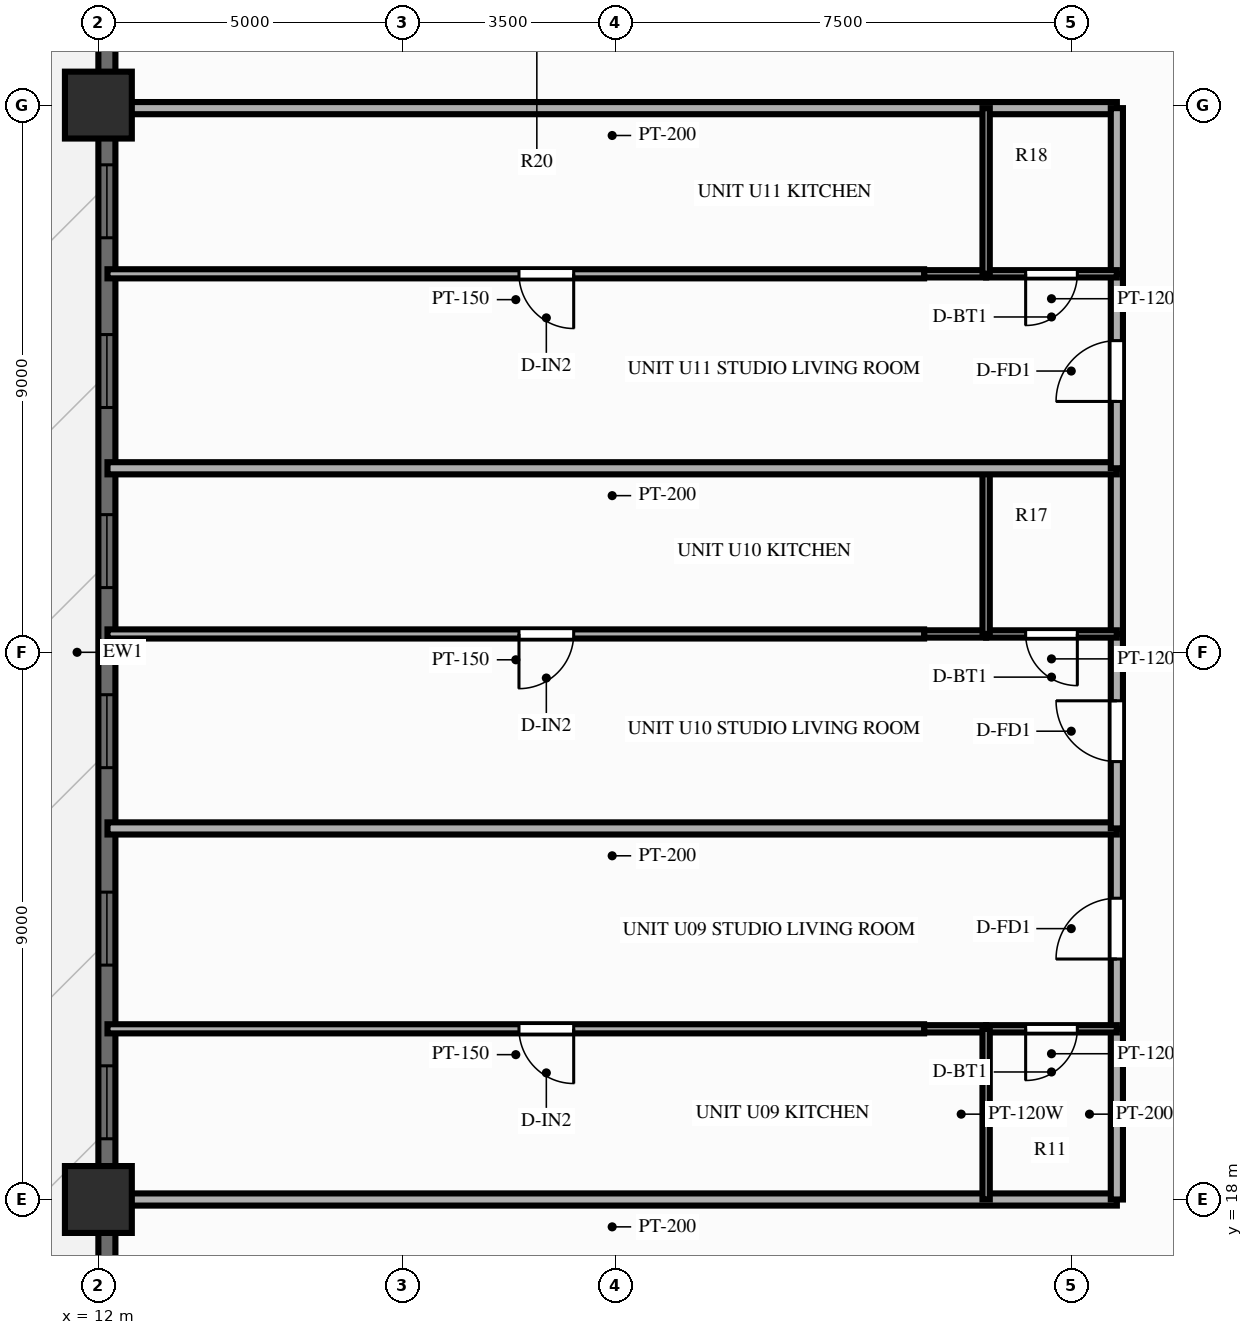
"""IFC4 building model, lengths in metres.
Left out: names, types, materials, properties, quantities, classifications, styles, units other than length and angle.
Written with IfcOpenShell. Run it as: python <this file> out.ifc"""

import sys

from ifc_helpers import new_model, si_unit, direction, frame, frame_2d, origin, origin_2d, place, context, subcontext, project, spatial, rectangle, extrude, source, transform, mapped, element, fill, save


model = new_model("IFC4")
c1 = context("Model", 3, precision=1e-05, world=origin(), true_north=direction((0.0, 1.0)))
c2 = subcontext(c1, "Body", "Model", "MODEL_VIEW")
j1 = project(units=[si_unit("LENGTHUNIT", "METRE"), si_unit("PLANEANGLEUNIT", "RADIAN")], contexts=[c1])
p1 = place(None, origin())
s1 = spatial("IfcSite", under=j1, at=p1, CompositionType="ELEMENT")
p2 = place(p1, origin())
s2 = spatial("IfcBuilding", under=s1, at=p2, CompositionType="ELEMENT")
p3 = place(p2, frame((0.0, 0.0, 34.4)))
s3 = spatial("IfcBuildingStorey", under=s2, at=p3, CompositionType="ELEMENT", Elevation=34.4)
m1 = source(origin(), c2, "Body", "SweptSolid", [
    extrude(rectangle(XDim=1.1, YDim=1.1, at=origin_2d()), origin(), (0.0, 0.0, 1.0), 3.0),
])
for number, where, z_axis, x_axis in (
    (1, (12.0, 36.0, 0.0), (0.0, 0.0, 1.0), (1.0, 0.0, 0.0)),
    (2, (12.0, 18.0, 0.0), (0.0, 0.0, 1.0), (1.0, 0.0, 0.0)),
):
    element("IfcColumn", number, at=place(p3, frame(where, z_axis=z_axis, x_axis=x_axis)), inside=s3, PredefinedType="COLUMN", context=c2, shape_type="MappedRepresentation", body=[
        mapped(m1, transform((0.0, 0.0, 0.0), scale=1.0)),
    ])
p4 = place(p3, frame((12.14, 6.5, 0.0), z_axis=(0.0, 0.0, 1.0), x_axis=(0.0, 1.0, 0.0)))
e3 = element("IfcWall", 3, at=p4, inside=s3, PredefinedType="SOLIDWALL", context=c2, shape_type="SweptSolid", body=[
    extrude(rectangle(XDim=41.0, YDim=0.28, at=frame_2d((20.5, 0.0))), origin(), (0.0, 0.0, 1.0), 2.28),
])
p5 = place(p4, frame((5.15, 0.0, 0.25)))
e4 = element("IfcOpeningElement", 4, at=p5, cuts=e3, PredefinedType="OPENING", context=c2, shape_type="SweptSolid", body=[
    extrude(rectangle(XDim=1.2, YDim=1.5, at=frame_2d((0.6, 0.75))), frame((0.0, 0.152, 0.0), z_axis=(0.0, -1.0, 0.0), x_axis=(1.0, 0.0, 0.0)), (0.0, 0.0, 1.0), 0.304),
])
p6 = place(p4, frame((12.499, 0.0, 0.25)))
e5 = element("IfcOpeningElement", 5, at=p6, cuts=e3, PredefinedType="OPENING", context=c2, shape_type="SweptSolid", body=[
    extrude(rectangle(XDim=1.2, YDim=1.5, at=frame_2d((0.6, 0.75))), frame((0.0, 0.152, 0.0), z_axis=(0.0, -1.0, 0.0), x_axis=(1.0, 0.0, 0.0)), (0.0, 0.0, 1.0), 0.304),
])
p7 = place(p4, frame((15.355, 0.0, 0.25)))
e6 = element("IfcOpeningElement", 6, at=p7, cuts=e3, PredefinedType="OPENING", context=c2, shape_type="SweptSolid", body=[
    extrude(rectangle(XDim=1.2, YDim=1.5, at=frame_2d((0.6, 0.75))), frame((0.0, 0.152, 0.0), z_axis=(0.0, -1.0, 0.0), x_axis=(1.0, 0.0, 0.0)), (0.0, 0.0, 1.0), 0.304),
])
p8 = place(p4, frame((18.602, 0.0, 0.25)))
e7 = element("IfcOpeningElement", 7, at=p8, cuts=e3, PredefinedType="OPENING", context=c2, shape_type="SweptSolid", body=[
    extrude(rectangle(XDim=1.2, YDim=1.5, at=frame_2d((0.6, 0.75))), frame((0.0, 0.152, 0.0), z_axis=(0.0, -1.0, 0.0), x_axis=(1.0, 0.0, 0.0)), (0.0, 0.0, 1.0), 0.304),
])
p9 = place(p4, frame((21.564, 0.0, 0.25)))
e8 = element("IfcOpeningElement", 8, at=p9, cuts=e3, PredefinedType="OPENING", context=c2, shape_type="SweptSolid", body=[
    extrude(rectangle(XDim=1.2, YDim=1.5, at=frame_2d((0.6, 0.75))), frame((0.0, 0.152, 0.0), z_axis=(0.0, -1.0, 0.0), x_axis=(1.0, 0.0, 0.0)), (0.0, 0.0, 1.0), 0.304),
])
p10 = place(p4, frame((24.526, 0.0, 0.25)))
e9 = element("IfcOpeningElement", 9, at=p10, cuts=e3, PredefinedType="OPENING", context=c2, shape_type="SweptSolid", body=[
    extrude(rectangle(XDim=1.2, YDim=1.5, at=frame_2d((0.6, 0.75))), frame((0.0, 0.152, 0.0), z_axis=(0.0, -1.0, 0.0), x_axis=(1.0, 0.0, 0.0)), (0.0, 0.0, 1.0), 0.304),
])
p11 = place(p4, frame((27.318, 0.0, 0.25)))
e10 = element("IfcOpeningElement", 10, at=p11, cuts=e3, PredefinedType="OPENING", context=c2, shape_type="SweptSolid", body=[
    extrude(rectangle(XDim=1.2, YDim=1.5, at=frame_2d((0.6, 0.75))), frame((0.0, 0.152, 0.0), z_axis=(0.0, -1.0, 0.0), x_axis=(1.0, 0.0, 0.0)), (0.0, 0.0, 1.0), 0.304),
])
p12 = place(p4, frame((34.45, 0.0, 0.0)))
e11 = element("IfcOpeningElement", 11, at=p12, cuts=e3, PredefinedType="OPENING", context=c2, shape_type="SweptSolid", body=[
    extrude(rectangle(XDim=1.6, YDim=2.15, at=frame_2d((0.8, 1.075))), frame((0.0, 0.152, 0.0), z_axis=(0.0, -1.0, 0.0), x_axis=(1.0, 0.0, 0.0)), (0.0, 0.0, 1.0), 0.304),
])
for number, where, z_axis, x_axis in (
    (12, (28.75, 18.0, 0.0), (0.0, 0.0, 1.0), (-1.0, 0.0, 0.0)),
    (13, (28.75, 35.95, 0.0), (0.0, 0.0, 1.0), (-1.0, 0.0, 0.0)),
):
    element("IfcWall", number, at=place(p3, frame(where, z_axis=z_axis, x_axis=x_axis)), inside=s3, PredefinedType="PARTITIONING", context=c2, shape_type="SweptSolid", body=[
        extrude(rectangle(XDim=16.6, YDim=0.2, at=frame_2d((8.3, 0.0))), origin(), (0.0, 0.0, 1.0), 2.24),
    ])
p13 = place(p3, frame((28.75, 18.0, 0.0), z_axis=(0.0, 0.0, 1.0), x_axis=(0.0, 1.0, 0.0)))
e14 = element("IfcWall", 14, at=p13, inside=s3, PredefinedType="PARTITIONING", context=c2, shape_type="SweptSolid", body=[
    extrude(rectangle(XDim=2.807, YDim=0.2, at=frame_2d((1.404, 0.0))), origin(), (0.0, 0.0, 1.0), 2.79),
])
p14 = place(p3, frame((28.75, 20.807, 0.0), z_axis=(0.0, 0.0, 1.0), x_axis=(0.0, 1.0, 0.0)))
e15 = element("IfcWall", 15, at=p14, inside=s3, PredefinedType="PARTITIONING", context=c2, shape_type="SweptSolid", body=[
    extrude(rectangle(XDim=3.296, YDim=0.2, at=frame_2d((1.648, 0.0))), origin(), (0.0, 0.0, 1.0), 2.79),
])
p15 = place(p14, frame((1.148, 0.0, 0.0)))
e16 = element("IfcOpeningElement", 16, at=p15, cuts=e15, PredefinedType="OPENING", context=c2, shape_type="SweptSolid", body=[
    extrude(rectangle(XDim=1.0, YDim=2.15, at=frame_2d((0.5, 1.075))), frame((0.0, 0.112, 0.0), z_axis=(0.0, -1.0, 0.0), x_axis=(1.0, 0.0, 0.0)), (0.0, 0.0, 1.0), 0.224),
])
p16 = place(p3, frame((28.75, 20.807, 0.0), z_axis=(0.0, 0.0, 1.0), x_axis=(-1.0, 0.0, 0.0)))
e17 = element("IfcWall", 17, at=p16, inside=s3, PredefinedType="PARTITIONING", context=c2, shape_type="SweptSolid", body=[
    extrude(rectangle(XDim=2.15, YDim=0.12, at=frame_2d((1.075, 0.0))), origin(), (0.0, 0.0, 1.0), 2.79),
])
p17 = place(p16, frame((0.65, 0.0, 0.0)))
e18 = element("IfcOpeningElement", 18, at=p17, cuts=e17, PredefinedType="OPENING", context=c2, shape_type="SweptSolid", body=[
    extrude(rectangle(XDim=0.85, YDim=2.05, at=frame_2d((0.425, 1.025))), frame((0.0, 0.072, 0.0), z_axis=(0.0, -1.0, 0.0), x_axis=(1.0, 0.0, 0.0)), (0.0, 0.0, 1.0), 0.144),
])
p18 = place(p3, frame((26.6, 20.807, 0.0), z_axis=(0.0, 0.0, 1.0), x_axis=(-1.0, 0.0, 0.0)))
e19 = element("IfcWall", 19, at=p18, inside=s3, PredefinedType="PARTITIONING", context=c2, shape_type="SweptSolid", body=[
    extrude(rectangle(XDim=1.02, YDim=0.12, at=frame_2d((0.51, 0.0))), origin(), (0.0, 0.0, 1.0), 2.79),
])
p19 = place(p3, frame((26.6, 18.0, 0.0), z_axis=(0.0, 0.0, 1.0), x_axis=(0.0, 1.0, 0.0)))
e20 = element("IfcWall", 20, at=p19, inside=s3, PredefinedType="PARTITIONING", context=c2, shape_type="SweptSolid", body=[
    extrude(rectangle(XDim=2.807, YDim=0.12, at=frame_2d((1.404, 0.0))), origin(), (0.0, 0.0, 1.0), 2.79),
])
p20 = place(p3, frame((25.58, 20.807, 0.0), z_axis=(0.0, 0.0, 1.0), x_axis=(-1.0, 0.0, 0.0)))
e21 = element("IfcWall", 21, at=p20, inside=s3, PredefinedType="PARTITIONING", context=c2, shape_type="SweptSolid", body=[
    extrude(rectangle(XDim=13.43, YDim=0.15, at=frame_2d((6.715, 0.0))), origin(), (0.0, 0.0, 1.0), 2.79),
])
p21 = place(p20, frame((5.763, 0.0, 0.0)))
e22 = element("IfcOpeningElement", 22, at=p21, cuts=e21, PredefinedType="OPENING", context=c2, shape_type="SweptSolid", body=[
    extrude(rectangle(XDim=0.9, YDim=2.1, at=frame_2d((0.45, 1.05))), frame((0.0, 0.087, 0.0), z_axis=(0.0, -1.0, 0.0), x_axis=(1.0, 0.0, 0.0)), (0.0, 0.0, 1.0), 0.174),
])
p22 = place(p3, frame((28.75, 24.103, 0.0), z_axis=(0.0, 0.0, 1.0), x_axis=(-1.0, 0.0, 0.0)))
e23 = element("IfcWall", 23, at=p22, inside=s3, PredefinedType="PARTITIONING", context=c2, shape_type="SweptSolid", body=[
    extrude(rectangle(XDim=16.6, YDim=0.2, at=frame_2d((8.3, 0.0))), origin(), (0.0, 0.0, 1.0), 2.79),
])
p23 = place(p3, frame((28.75, 24.103, 0.0), z_axis=(0.0, 0.0, 1.0), x_axis=(0.0, 1.0, 0.0)))
e24 = element("IfcWall", 24, at=p23, inside=s3, PredefinedType="PARTITIONING", context=c2, shape_type="SweptSolid", body=[
    extrude(rectangle(XDim=3.199, YDim=0.2, at=frame_2d((1.599, 0.0))), origin(), (0.0, 0.0, 1.0), 2.79),
])
p24 = place(p23, frame((1.099, 0.0, 0.0)))
e25 = element("IfcOpeningElement", 25, at=p24, cuts=e24, PredefinedType="OPENING", context=c2, shape_type="SweptSolid", body=[
    extrude(rectangle(XDim=1.0, YDim=2.15, at=frame_2d((0.5, 1.075))), frame((0.0, 0.112, 0.0), z_axis=(0.0, -1.0, 0.0), x_axis=(1.0, 0.0, 0.0)), (0.0, 0.0, 1.0), 0.224),
])
p25 = place(p3, frame((28.75, 27.302, 0.0), z_axis=(0.0, 0.0, 1.0), x_axis=(0.0, 1.0, 0.0)))
e26 = element("IfcWall", 26, at=p25, inside=s3, PredefinedType="PARTITIONING", context=c2, shape_type="SweptSolid", body=[
    extrude(rectangle(XDim=2.725, YDim=0.2, at=frame_2d((1.362, 0.0))), origin(), (0.0, 0.0, 1.0), 2.79),
])
p26 = place(p3, frame((28.75, 27.302, 0.0), z_axis=(0.0, 0.0, 1.0), x_axis=(-1.0, 0.0, 0.0)))
e27 = element("IfcWall", 27, at=p26, inside=s3, PredefinedType="PARTITIONING", context=c2, shape_type="SweptSolid", body=[
    extrude(rectangle(XDim=2.15, YDim=0.12, at=frame_2d((1.075, 0.0))), origin(), (0.0, 0.0, 1.0), 2.79),
])
p27 = place(p26, frame((0.65, 0.0, 0.0)))
e28 = element("IfcOpeningElement", 28, at=p27, cuts=e27, PredefinedType="OPENING", context=c2, shape_type="SweptSolid", body=[
    extrude(rectangle(XDim=0.85, YDim=2.05, at=frame_2d((0.425, 1.025))), frame((0.0, 0.072, 0.0), z_axis=(0.0, -1.0, 0.0), x_axis=(1.0, 0.0, 0.0)), (0.0, 0.0, 1.0), 0.144),
])
p28 = place(p3, frame((26.6, 27.302, 0.0), z_axis=(0.0, 0.0, 1.0), x_axis=(-1.0, 0.0, 0.0)))
e29 = element("IfcWall", 29, at=p28, inside=s3, PredefinedType="PARTITIONING", context=c2, shape_type="SweptSolid", body=[
    extrude(rectangle(XDim=1.02, YDim=0.12, at=frame_2d((0.51, 0.0))), origin(), (0.0, 0.0, 1.0), 2.79),
])
p29 = place(p3, frame((26.6, 27.302, 0.0), z_axis=(0.0, 0.0, 1.0), x_axis=(0.0, 1.0, 0.0)))
e30 = element("IfcWall", 30, at=p29, inside=s3, PredefinedType="PARTITIONING", context=c2, shape_type="SweptSolid", body=[
    extrude(rectangle(XDim=2.725, YDim=0.12, at=frame_2d((1.362, 0.0))), origin(), (0.0, 0.0, 1.0), 2.79),
])
p30 = place(p3, frame((25.58, 27.302, 0.0), z_axis=(0.0, 0.0, 1.0), x_axis=(-1.0, 0.0, 0.0)))
e31 = element("IfcWall", 31, at=p30, inside=s3, PredefinedType="PARTITIONING", context=c2, shape_type="SweptSolid", body=[
    extrude(rectangle(XDim=13.43, YDim=0.15, at=frame_2d((6.715, 0.0))), origin(), (0.0, 0.0, 1.0), 2.79),
])
p31 = place(p30, frame((5.763, 0.0, 0.0)))
e32 = element("IfcOpeningElement", 32, at=p31, cuts=e31, PredefinedType="OPENING", context=c2, shape_type="SweptSolid", body=[
    extrude(rectangle(XDim=0.9, YDim=2.1, at=frame_2d((0.45, 1.05))), frame((0.0, 0.087, 0.0), z_axis=(0.0, -1.0, 0.0), x_axis=(1.0, 0.0, 0.0)), (0.0, 0.0, 1.0), 0.174),
])
p32 = place(p3, frame((28.75, 30.027, 0.0), z_axis=(0.0, 0.0, 1.0), x_axis=(-1.0, 0.0, 0.0)))
e33 = element("IfcWall", 33, at=p32, inside=s3, PredefinedType="PARTITIONING", context=c2, shape_type="SweptSolid", body=[
    extrude(rectangle(XDim=16.6, YDim=0.2, at=frame_2d((8.3, 0.0))), origin(), (0.0, 0.0, 1.0), 2.79),
])
p33 = place(p3, frame((28.75, 30.027, 0.0), z_axis=(0.0, 0.0, 1.0), x_axis=(0.0, 1.0, 0.0)))
e34 = element("IfcWall", 34, at=p33, inside=s3, PredefinedType="PARTITIONING", context=c2, shape_type="SweptSolid", body=[
    extrude(rectangle(XDim=3.198, YDim=0.2, at=frame_2d((1.599, 0.0))), origin(), (0.0, 0.0, 1.0), 2.79),
])
p34 = place(p33, frame((1.099, 0.0, 0.0)))
e35 = element("IfcOpeningElement", 35, at=p34, cuts=e34, PredefinedType="OPENING", context=c2, shape_type="SweptSolid", body=[
    extrude(rectangle(XDim=1.0, YDim=2.15, at=frame_2d((0.5, 1.075))), frame((0.0, 0.112, 0.0), z_axis=(0.0, -1.0, 0.0), x_axis=(1.0, 0.0, 0.0)), (0.0, 0.0, 1.0), 0.224),
])
p35 = place(p3, frame((28.75, 33.225, 0.0), z_axis=(0.0, 0.0, 1.0), x_axis=(0.0, 1.0, 0.0)))
e36 = element("IfcWall", 36, at=p35, inside=s3, PredefinedType="PARTITIONING", context=c2, shape_type="SweptSolid", body=[
    extrude(rectangle(XDim=2.725, YDim=0.2, at=frame_2d((1.362, 0.0))), origin(), (0.0, 0.0, 1.0), 2.79),
])
p36 = place(p3, frame((28.75, 33.225, 0.0), z_axis=(0.0, 0.0, 1.0), x_axis=(-1.0, 0.0, 0.0)))
e37 = element("IfcWall", 37, at=p36, inside=s3, PredefinedType="PARTITIONING", context=c2, shape_type="SweptSolid", body=[
    extrude(rectangle(XDim=2.15, YDim=0.12, at=frame_2d((1.075, 0.0))), origin(), (0.0, 0.0, 1.0), 2.79),
])
p37 = place(p36, frame((0.65, 0.0, 0.0)))
e38 = element("IfcOpeningElement", 38, at=p37, cuts=e37, PredefinedType="OPENING", context=c2, shape_type="SweptSolid", body=[
    extrude(rectangle(XDim=0.85, YDim=2.05, at=frame_2d((0.425, 1.025))), frame((0.0, 0.072, 0.0), z_axis=(0.0, -1.0, 0.0), x_axis=(1.0, 0.0, 0.0)), (0.0, 0.0, 1.0), 0.144),
])
p38 = place(p3, frame((26.6, 33.225, 0.0), z_axis=(0.0, 0.0, 1.0), x_axis=(-1.0, 0.0, 0.0)))
e39 = element("IfcWall", 39, at=p38, inside=s3, PredefinedType="PARTITIONING", context=c2, shape_type="SweptSolid", body=[
    extrude(rectangle(XDim=1.02, YDim=0.12, at=frame_2d((0.51, 0.0))), origin(), (0.0, 0.0, 1.0), 2.79),
])
p39 = place(p3, frame((26.6, 33.225, 0.0), z_axis=(0.0, 0.0, 1.0), x_axis=(0.0, 1.0, 0.0)))
e40 = element("IfcWall", 40, at=p39, inside=s3, PredefinedType="PARTITIONING", context=c2, shape_type="SweptSolid", body=[
    extrude(rectangle(XDim=2.725, YDim=0.12, at=frame_2d((1.362, 0.0))), origin(), (0.0, 0.0, 1.0), 2.79),
])
p40 = place(p3, frame((25.58, 33.225, 0.0), z_axis=(0.0, 0.0, 1.0), x_axis=(-1.0, 0.0, 0.0)))
e41 = element("IfcWall", 41, at=p40, inside=s3, PredefinedType="PARTITIONING", context=c2, shape_type="SweptSolid", body=[
    extrude(rectangle(XDim=13.43, YDim=0.15, at=frame_2d((6.715, 0.0))), origin(), (0.0, 0.0, 1.0), 2.79),
])
p41 = place(p40, frame((5.763, 0.0, 0.0)))
e42 = element("IfcOpeningElement", 42, at=p41, cuts=e41, PredefinedType="OPENING", context=c2, shape_type="SweptSolid", body=[
    extrude(rectangle(XDim=0.9, YDim=2.1, at=frame_2d((0.45, 1.05))), frame((0.0, 0.087, 0.0), z_axis=(0.0, -1.0, 0.0), x_axis=(1.0, 0.0, 0.0)), (0.0, 0.0, 1.0), 0.174),
])
m2 = source(origin(), c2, "Body", "SweptSolid", [
    extrude(rectangle(XDim=1.2, YDim=1.5, at=frame_2d((0.6, 0.75))), frame((0.0, 0.03, 0.0), z_axis=(0.0, -1.0, 0.0), x_axis=(1.0, 0.0, 0.0)), (0.0, 0.0, 1.0), 0.06),
])
p42 = place(p6, origin())
e43 = element("IfcWindow", 43, at=p42, inside=s3, PartitioningType="SINGLE_PANEL", PredefinedType="WINDOW", context=c2, shape_type="MappedRepresentation", body=[
    mapped(m2, transform((0.0, 0.0, 0.0), scale=1.0)),
])
fill(e5, e43)
p43 = place(p7, origin())
e44 = element("IfcWindow", 44, at=p43, inside=s3, PartitioningType="SINGLE_PANEL", PredefinedType="WINDOW", context=c2, shape_type="MappedRepresentation", body=[
    mapped(m2, transform((0.0, 0.0, 0.0), scale=1.0)),
])
fill(e6, e44)
p44 = place(p8, origin())
e45 = element("IfcWindow", 45, at=p44, inside=s3, PartitioningType="SINGLE_PANEL", PredefinedType="WINDOW", context=c2, shape_type="MappedRepresentation", body=[
    mapped(m2, transform((0.0, 0.0, 0.0), scale=1.0)),
])
fill(e7, e45)
p45 = place(p9, origin())
e46 = element("IfcWindow", 46, at=p45, inside=s3, PartitioningType="SINGLE_PANEL", PredefinedType="WINDOW", context=c2, shape_type="MappedRepresentation", body=[
    mapped(m2, transform((0.0, 0.0, 0.0), scale=1.0)),
])
fill(e8, e46)
p46 = place(p10, origin())
e47 = element("IfcWindow", 47, at=p46, inside=s3, PartitioningType="SINGLE_PANEL", PredefinedType="WINDOW", context=c2, shape_type="MappedRepresentation", body=[
    mapped(m2, transform((0.0, 0.0, 0.0), scale=1.0)),
])
fill(e9, e47)
p47 = place(p11, origin())
e48 = element("IfcWindow", 48, at=p47, inside=s3, PartitioningType="SINGLE_PANEL", PredefinedType="WINDOW", context=c2, shape_type="MappedRepresentation", body=[
    mapped(m2, transform((0.0, 0.0, 0.0), scale=1.0)),
])
fill(e10, e48)
m3 = source(origin(), c2, "Body", "SweptSolid", [
    extrude(rectangle(XDim=1.0, YDim=2.15, at=frame_2d((0.5, 1.075))), frame((0.0, 0.025, 0.0), z_axis=(0.0, -1.0, 0.0), x_axis=(1.0, 0.0, 0.0)), (0.0, 0.0, 1.0), 0.05),
])
p48 = place(p15, origin())
e49 = element("IfcDoor", 49, at=p48, inside=s3, OperationType="SINGLE_SWING_LEFT", PredefinedType="DOOR", context=c2, shape_type="MappedRepresentation", body=[
    mapped(m3, transform((0.0, 0.0, 0.0), scale=1.0)),
])
fill(e16, e49)
m4 = source(origin(), c2, "Body", "SweptSolid", [
    extrude(rectangle(XDim=0.85, YDim=2.05, at=frame_2d((0.425, 1.025))), frame((0.0, 0.025, 0.0), z_axis=(0.0, -1.0, 0.0), x_axis=(1.0, 0.0, 0.0)), (0.0, 0.0, 1.0), 0.05),
])
p49 = place(p17, origin())
e50 = element("IfcDoor", 50, at=p49, inside=s3, OperationType="SINGLE_SWING_RIGHT", PredefinedType="DOOR", context=c2, shape_type="MappedRepresentation", body=[
    mapped(m4, transform((0.0, 0.0, 0.0), scale=1.0)),
])
fill(e18, e50)
m5 = source(origin(), c2, "Body", "SweptSolid", [
    extrude(rectangle(XDim=0.9, YDim=2.1, at=frame_2d((0.45, 1.05))), frame((0.0, 0.025, 0.0), z_axis=(0.0, -1.0, 0.0), x_axis=(1.0, 0.0, 0.0)), (0.0, 0.0, 1.0), 0.05),
])
p50 = place(p21, origin())
e51 = element("IfcDoor", 51, at=p50, inside=s3, OperationType="SINGLE_SWING_LEFT", PredefinedType="DOOR", context=c2, shape_type="MappedRepresentation", body=[
    mapped(m5, transform((0.0, 0.0, 0.0), scale=1.0)),
])
fill(e22, e51)
p51 = place(p24, origin())
e52 = element("IfcDoor", 52, at=p51, inside=s3, OperationType="SINGLE_SWING_RIGHT", PredefinedType="DOOR", context=c2, shape_type="MappedRepresentation", body=[
    mapped(m3, transform((0.0, 0.0, 0.0), scale=1.0)),
])
fill(e25, e52)
p52 = place(p27, origin())
e53 = element("IfcDoor", 53, at=p52, inside=s3, OperationType="SINGLE_SWING_LEFT", PredefinedType="DOOR", context=c2, shape_type="MappedRepresentation", body=[
    mapped(m4, transform((0.0, 0.0, 0.0), scale=1.0)),
])
fill(e28, e53)
p53 = place(p31, origin())
e54 = element("IfcDoor", 54, at=p53, inside=s3, OperationType="SINGLE_SWING_RIGHT", PredefinedType="DOOR", context=c2, shape_type="MappedRepresentation", body=[
    mapped(m5, transform((0.0, 0.0, 0.0), scale=1.0)),
])
fill(e32, e54)
p54 = place(p34, origin())
e55 = element("IfcDoor", 55, at=p54, inside=s3, OperationType="SINGLE_SWING_LEFT", PredefinedType="DOOR", context=c2, shape_type="MappedRepresentation", body=[
    mapped(m3, transform((0.0, 0.0, 0.0), scale=1.0)),
])
fill(e35, e55)
p55 = place(p37, origin())
e56 = element("IfcDoor", 56, at=p55, inside=s3, OperationType="SINGLE_SWING_RIGHT", PredefinedType="DOOR", context=c2, shape_type="MappedRepresentation", body=[
    mapped(m4, transform((0.0, 0.0, 0.0), scale=1.0)),
])
fill(e38, e56)
p56 = place(p41, origin())
e57 = element("IfcDoor", 57, at=p56, inside=s3, OperationType="SINGLE_SWING_LEFT", PredefinedType="DOOR", context=c2, shape_type="MappedRepresentation", body=[
    mapped(m5, transform((0.0, 0.0, 0.0), scale=1.0)),
])
fill(e42, e57)
save(model, sys.argv[1])
